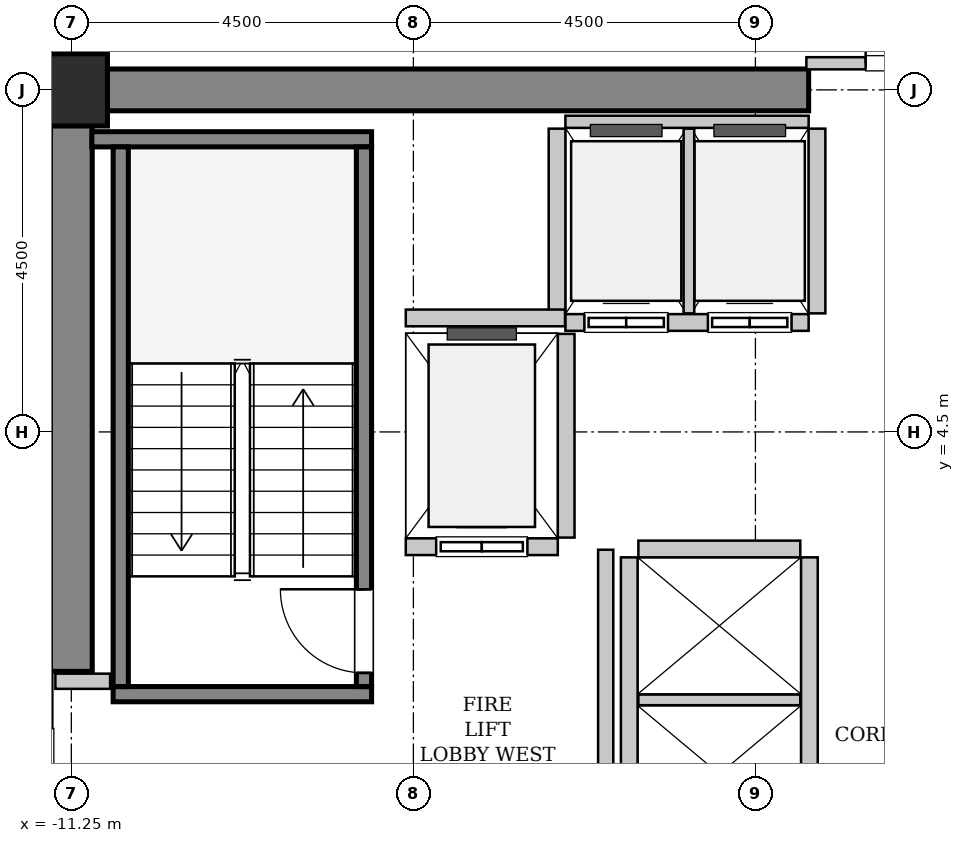
"""IFC4 building model, lengths in metres.
Left out: names, types, materials, properties, quantities, classifications, styles, units other than length and angle.
Written with IfcOpenShell. Run it as: python <this file> out.ifc"""

import sys

from ifc_helpers import new_model, si_unit, direction, frame, frame_2d, origin, origin_2d, place, context, subcontext, project, spatial, rectangle, hollow_rectangle, extrude, source, transform, mapped, element, fill, save


model = new_model("IFC4")
c1 = context("Model", 3, precision=1e-05, world=origin(), true_north=direction((0.0, 1.0)))
c2 = subcontext(c1, "Body", "Model", "MODEL_VIEW")
j1 = project(units=[si_unit("LENGTHUNIT", "METRE"), si_unit("PLANEANGLEUNIT", "RADIAN")], contexts=[c1])
p1 = place(None, origin())
s1 = spatial("IfcSite", under=j1, at=p1, CompositionType="ELEMENT")
p2 = place(p1, origin())
s2 = spatial("IfcBuilding", under=s1, at=p2, CompositionType="ELEMENT")
p3 = place(p2, frame((0.0, 0.0, 125.0)))
s3 = spatial("IfcBuildingStorey", under=s2, at=p3, CompositionType="ELEMENT", Elevation=125.0)
m1 = source(origin(), c2, "Body", "SweptSolid", [
    extrude(rectangle(XDim=9.975, YDim=0.55, at=frame_2d((4.987, 0.0))), origin(), (0.0, 0.0, 1.0), 3.8),
])
p4 = place(p3, frame((-11.525, 9.0, 0.0), z_axis=(0.0, 0.0, 1.0), x_axis=(1.0, 0.0, 0.0)))
e1 = element("IfcWall", 1, at=p4, inside=s3, PredefinedType="SHEAR", context=c2, shape_type="MappedRepresentation", body=[
    mapped(m1, transform((0.0, 0.0, 0.0), x_axis=(1.0, 0.0, 0.0), y_axis=(0.0, 1.0, 0.0), z_axis=(0.0, 0.0, 1.0), scale=1.0)),
])
m2 = source(origin(), c2, "Body", "SweptSolid", [
    extrude(rectangle(XDim=7.375, YDim=0.55, at=frame_2d((3.688, 0.0))), origin(), (0.0, 0.0, 1.0), 3.8),
])
p5 = place(p3, frame((-11.25, 1.35, 0.0), z_axis=(0.0, 0.0, 1.0), x_axis=(0.0, 1.0, 0.0)))
e2 = element("IfcWall", 2, at=p5, inside=s3, PredefinedType="SHEAR", context=c2, shape_type="MappedRepresentation", body=[
    mapped(m2, transform((0.0, 0.0, 0.0), x_axis=(1.0, 0.0, 0.0), y_axis=(0.0, 1.0, 0.0), z_axis=(0.0, 0.0, 1.0), scale=1.0)),
])
m3 = source(origin(), c2, "Body", "SweptSolid", [
    extrude(hollow_rectangle(XDim=0.95, YDim=0.95, WallThickness=0.045, InnerFilletRadius=0.045, OuterFilletRadius=0.09, at=origin_2d()), origin(), (0.0, 0.0, 1.0), 3.8),
])
p6 = place(p3, frame((-11.25, 9.0, 0.0), z_axis=(0.0, 0.0, 1.0), x_axis=(1.0, 0.0, 0.0)))
e3 = element("IfcColumn", 3, at=p6, inside=s3, PredefinedType="COLUMN", context=c2, shape_type="MappedRepresentation", body=[
    mapped(m3, transform((0.0, 0.0, 0.0), x_axis=(1.0, 0.0, 0.0), y_axis=(0.0, 1.0, 0.0), z_axis=(0.0, 0.0, 1.0), scale=1.0)),
])
m4 = source(origin(), c2, "Body", "SweptSolid", [
    extrude(rectangle(XDim=3.4, YDim=0.2, at=frame_2d((1.7, 0.0))), origin(), (0.0, 0.0, 1.0), 3.8),
])
p7 = place(p3, frame((-7.3, 1.05, 0.0), z_axis=(0.0, 0.0, 1.0), x_axis=(-1.0, 0.0, 0.0)))
e4 = element("IfcWall", 4, at=p7, inside=s3, PredefinedType="SOLIDWALL", context=c2, shape_type="MappedRepresentation", body=[
    mapped(m4, transform((0.0, 0.0, 0.0), x_axis=(1.0, 0.0, 0.0), y_axis=(0.0, 1.0, 0.0), z_axis=(0.0, 0.0, 1.0), scale=1.0)),
])
m5 = source(origin(), c2, "Body", "SweptSolid", [
    extrude(rectangle(XDim=3.68, YDim=0.2, at=frame_2d((1.84, 0.0))), origin(), (0.0, 0.0, 1.0), 3.8),
])
p8 = place(p3, frame((-7.3, 8.35, 0.0), z_axis=(0.0, 0.0, 1.0), x_axis=(-1.0, 0.0, 0.0)))
e5 = element("IfcWall", 5, at=p8, inside=s3, PredefinedType="SOLIDWALL", context=c2, shape_type="MappedRepresentation", body=[
    mapped(m5, transform((0.0, 0.0, 0.0), x_axis=(1.0, 0.0, 0.0), y_axis=(0.0, 1.0, 0.0), z_axis=(0.0, 0.0, 1.0), scale=1.0)),
])
m6 = source(origin(), c2, "Body", "SweptSolid", [
    extrude(rectangle(XDim=7.1, YDim=0.2, at=frame_2d((3.55, 0.0))), origin(), (0.0, 0.0, 1.0), 3.8),
])
p9 = place(p3, frame((-7.4, 1.15, 0.0), z_axis=(0.0, 0.0, 1.0), x_axis=(0.0, 1.0, 0.0)))
e6 = element("IfcWall", 6, at=p9, inside=s3, PredefinedType="SOLIDWALL", context=c2, shape_type="MappedRepresentation", body=[
    mapped(m6, transform((0.0, 0.0, 0.0), x_axis=(1.0, 0.0, 0.0), y_axis=(0.0, 1.0, 0.0), z_axis=(0.0, 0.0, 1.0), scale=1.0)),
])
p10 = place(p9, frame((0.18, 0.0, 0.0)))
e7 = element("IfcOpeningElement", 7, at=p10, cuts=e6, PredefinedType="OPENING", context=c2, shape_type="SweptSolid", body=[
    extrude(rectangle(XDim=1.1, YDim=2.15, at=frame_2d((0.55, 1.075))), frame((0.0, 0.11, 0.0), z_axis=(0.0, -1.0, 0.0), x_axis=(1.0, 0.0, 0.0)), (0.0, 0.0, 1.0), 0.22),
])
p11 = place(p3, frame((-10.6, 1.15, 0.0), z_axis=(0.0, 0.0, 1.0), x_axis=(0.0, 1.0, 0.0)))
e8 = element("IfcWall", 8, at=p11, inside=s3, PredefinedType="SOLIDWALL", context=c2, shape_type="MappedRepresentation", body=[
    mapped(m6, transform((0.0, 0.0, 0.0), x_axis=(1.0, 0.0, 0.0), y_axis=(0.0, 1.0, 0.0), z_axis=(0.0, 0.0, 1.0), scale=1.0)),
])
m7 = source(origin(), c2, "Body", "SweptSolid", [
    extrude(rectangle(XDim=2.0, YDim=0.22, at=frame_2d((1.0, 0.0))), origin(), (0.0, 0.0, 1.0), 3.535),
])
p12 = place(p3, frame((-6.85, 2.99, 0.0), z_axis=(0.0, 0.0, 1.0), x_axis=(1.0, 0.0, 0.0)))
e9 = element("IfcWall", 9, at=p12, inside=s3, PredefinedType="SOLIDWALL", context=c2, shape_type="MappedRepresentation", body=[
    mapped(m7, transform((0.0, 0.0, 0.0), x_axis=(1.0, 0.0, 0.0), y_axis=(0.0, 1.0, 0.0), z_axis=(0.0, 0.0, 1.0), scale=1.0)),
])
p13 = place(p12, frame((0.4, 0.0, 0.0)))
e10 = element("IfcOpeningElement", 10, at=p13, cuts=e9, PredefinedType="OPENING", context=c2, shape_type="SweptSolid", body=[
    extrude(rectangle(XDim=1.2, YDim=2.2, at=frame_2d((0.6, 1.1))), frame((0.0, 0.12, 0.0), z_axis=(0.0, -1.0, 0.0), x_axis=(1.0, 0.0, 0.0)), (0.0, 0.0, 1.0), 0.24),
])
m8 = source(origin(), c2, "Body", "SweptSolid", [
    extrude(rectangle(XDim=2.68, YDim=0.22, at=frame_2d((1.34, 0.0))), origin(), (0.0, 0.0, 1.0), 3.535),
])
p14 = place(p3, frame((-4.74, 3.11, 0.0), z_axis=(0.0, 0.0, 1.0), x_axis=(0.0, 1.0, 0.0)))
e11 = element("IfcWall", 11, at=p14, inside=s3, PredefinedType="SOLIDWALL", context=c2, shape_type="MappedRepresentation", body=[
    mapped(m8, transform((0.0, 0.0, 0.0), x_axis=(1.0, 0.0, 0.0), y_axis=(0.0, 1.0, 0.0), z_axis=(0.0, 0.0, 1.0), scale=1.0)),
])
m9 = source(origin(), c2, "Body", "SweptSolid", [
    extrude(rectangle(XDim=3.2, YDim=0.22, at=frame_2d((1.6, 0.0))), origin(), (0.0, 0.0, 1.0), 3.535),
])
p15 = place(p3, frame((-4.75, 5.94, 0.0), z_axis=(0.0, 0.0, 1.0), x_axis=(1.0, 0.0, 0.0)))
e12 = element("IfcWall", 12, at=p15, inside=s3, PredefinedType="SOLIDWALL", context=c2, shape_type="MappedRepresentation", body=[
    mapped(m9, transform((0.0, 0.0, 0.0), x_axis=(1.0, 0.0, 0.0), y_axis=(0.0, 1.0, 0.0), z_axis=(0.0, 0.0, 1.0), scale=1.0)),
])
p16 = place(p15, frame((0.25, 0.0, 0.0)))
e13 = element("IfcOpeningElement", 13, at=p16, cuts=e12, PredefinedType="OPENING", context=c2, shape_type="SweptSolid", body=[
    extrude(rectangle(XDim=1.1, YDim=2.2, at=frame_2d((0.55, 1.1))), frame((0.0, 0.12, 0.0), z_axis=(0.0, -1.0, 0.0), x_axis=(1.0, 0.0, 0.0)), (0.0, 0.0, 1.0), 0.24),
])
p17 = place(p15, frame((1.875, 0.0, 0.0)))
e14 = element("IfcOpeningElement", 14, at=p17, cuts=e12, PredefinedType="OPENING", context=c2, shape_type="SweptSolid", body=[
    extrude(rectangle(XDim=1.1, YDim=2.2, at=frame_2d((0.55, 1.1))), frame((0.0, 0.12, 0.0), z_axis=(0.0, -1.0, 0.0), x_axis=(1.0, 0.0, 0.0)), (0.0, 0.0, 1.0), 0.24),
])
m10 = source(origin(), c2, "Body", "SweptSolid", [
    extrude(rectangle(XDim=3.2, YDim=0.16, at=frame_2d((1.6, 0.0))), origin(), (0.0, 0.0, 1.0), 2.425),
])
p18 = place(p3, frame((-1.55, 8.58, 0.0), z_axis=(0.0, 0.0, 1.0), x_axis=(-1.0, 0.0, 0.0)))
e15 = element("IfcWall", 15, at=p18, inside=s3, PredefinedType="PARTITIONING", context=c2, shape_type="MappedRepresentation", body=[
    mapped(m10, transform((0.0, 0.0, 0.0), x_axis=(1.0, 0.0, 0.0), y_axis=(0.0, 1.0, 0.0), z_axis=(0.0, 0.0, 1.0), scale=1.0)),
])
m11 = source(origin(), c2, "Body", "SweptSolid", [
    extrude(rectangle(XDim=2.43, YDim=0.22, at=frame_2d((1.215, 0.0))), origin(), (0.0, 0.0, 1.0), 3.535),
])
p19 = place(p3, frame((-4.86, 8.49, 0.0), z_axis=(0.0, 0.0, 1.0), x_axis=(0.0, -1.0, 0.0)))
e16 = element("IfcWall", 16, at=p19, inside=s3, PredefinedType="SOLIDWALL", context=c2, shape_type="MappedRepresentation", body=[
    mapped(m11, transform((0.0, 0.0, 0.0), x_axis=(1.0, 0.0, 0.0), y_axis=(0.0, 1.0, 0.0), z_axis=(0.0, 0.0, 1.0), scale=1.0)),
])
m12 = source(origin(), c2, "Body", "SweptSolid", [
    extrude(rectangle(XDim=2.43, YDim=0.14, at=frame_2d((1.215, 0.0))), origin(), (0.0, 0.0, 1.0), 3.535),
])
p20 = place(p3, frame((-3.125, 6.06, 0.0), z_axis=(0.0, 0.0, 1.0), x_axis=(0.0, 1.0, 0.0)))
e17 = element("IfcWall", 17, at=p20, inside=s3, PredefinedType="PARTITIONING", context=c2, shape_type="MappedRepresentation", body=[
    mapped(m12, transform((0.0, 0.0, 0.0), x_axis=(1.0, 0.0, 0.0), y_axis=(0.0, 1.0, 0.0), z_axis=(0.0, 0.0, 1.0), scale=1.0)),
])
p21 = place(p3, frame((-1.44, 6.06, 0.0), z_axis=(0.0, 0.0, 1.0), x_axis=(0.0, 1.0, 0.0)))
e18 = element("IfcWall", 18, at=p21, inside=s3, PredefinedType="SOLIDWALL", context=c2, shape_type="MappedRepresentation", body=[
    mapped(m11, transform((0.0, 0.0, 0.0), x_axis=(1.0, 0.0, 0.0), y_axis=(0.0, 1.0, 0.0), z_axis=(0.0, 0.0, 1.0), scale=1.0)),
])
m13 = source(origin(), c2, "Body", "SweptSolid", [
    extrude(rectangle(XDim=5.7, YDim=0.22, at=frame_2d((2.85, 0.0))), origin(), (0.0, 0.0, 1.0), 3.535),
])
for number, where, z_axis, x_axis in (
    (19, (-1.54, -2.85, 0.0), (0.0, 0.0, 1.0), (0.0, 1.0, 0.0)),
    (20, (-3.91, 2.85, 0.0), (0.0, 0.0, 1.0), (0.0, -1.0, 0.0)),
):
    element("IfcWall", number, at=place(p3, frame(where, z_axis=z_axis, x_axis=x_axis)), inside=s3, PredefinedType="SOLIDWALL", context=c2, shape_type="MappedRepresentation", body=[
        mapped(m13, transform((0.0, 0.0, 0.0), x_axis=(1.0, 0.0, 0.0), y_axis=(0.0, 1.0, 0.0), z_axis=(0.0, 0.0, 1.0), scale=1.0)),
    ])
m14 = source(origin(), c2, "Body", "SweptSolid", [
    extrude(rectangle(XDim=2.13, YDim=0.14, at=frame_2d((1.065, 0.0))), origin(), (0.0, 0.0, 1.0), 3.535),
])
p22 = place(p3, frame((-3.79, 0.975, 0.0), z_axis=(0.0, 0.0, 1.0), x_axis=(1.0, 0.0, 0.0)))
e21 = element("IfcWall", 21, at=p22, inside=s3, PredefinedType="PARTITIONING", context=c2, shape_type="MappedRepresentation", body=[
    mapped(m14, transform((0.0, 0.0, 0.0), x_axis=(1.0, 0.0, 0.0), y_axis=(0.0, 1.0, 0.0), z_axis=(0.0, 0.0, 1.0), scale=1.0)),
])
m15 = source(origin(), c2, "Body", "SweptSolid", [
    extrude(rectangle(XDim=2.13, YDim=0.22, at=frame_2d((1.065, 0.0))), origin(), (0.0, 0.0, 1.0), 3.535),
])
p23 = place(p3, frame((-1.66, 2.96, 0.0), z_axis=(0.0, 0.0, 1.0), x_axis=(-1.0, 0.0, 0.0)))
e22 = element("IfcWall", 22, at=p23, inside=s3, PredefinedType="SOLIDWALL", context=c2, shape_type="MappedRepresentation", body=[
    mapped(m15, transform((0.0, 0.0, 0.0), x_axis=(1.0, 0.0, 0.0), y_axis=(0.0, 1.0, 0.0), z_axis=(0.0, 0.0, 1.0), scale=1.0)),
])
m16 = source(origin(), c2, "Body", "SweptSolid", [
    extrude(rectangle(XDim=2.095, YDim=0.22, at=frame_2d((1.048, 0.0))), origin(), (0.0, 0.0, 1.0), 3.535),
])
p24 = place(p3, frame((-6.85, 6.0, 0.0), z_axis=(0.0, 0.0, 1.0), x_axis=(1.0, 0.0, 0.0)))
e23 = element("IfcWall", 23, at=p24, inside=s3, PredefinedType="SOLIDWALL", context=c2, shape_type="MappedRepresentation", body=[
    mapped(m16, transform((0.0, 0.0, 0.0), x_axis=(1.0, 0.0, 0.0), y_axis=(0.0, 1.0, 0.0), z_axis=(0.0, 0.0, 1.0), scale=1.0)),
])
m17 = source(origin(), c2, "Body", "SweptSolid", [
    extrude(rectangle(XDim=5.9, YDim=0.2, at=frame_2d((2.95, 0.0))), origin(), (0.0, 0.0, 1.0), 3.535),
])
p25 = place(p3, frame((-4.22, -2.95, 0.0), z_axis=(0.0, 0.0, 1.0), x_axis=(0.0, 1.0, 0.0)))
e24 = element("IfcWall", 24, at=p25, inside=s3, PredefinedType="PARTITIONING", context=c2, shape_type="MappedRepresentation", body=[
    mapped(m17, transform((0.0, 0.0, 0.0), x_axis=(1.0, 0.0, 0.0), y_axis=(0.0, 1.0, 0.0), z_axis=(0.0, 0.0, 1.0), scale=1.0)),
])
m18 = source(origin(), c2, "Body", "SweptSolid", [
    extrude(rectangle(XDim=0.72, YDim=0.2, at=frame_2d((0.36, 0.0))), origin(), (0.0, 0.0, 1.0), 3.535),
])
p26 = place(p3, frame((-11.46, 1.22, 0.0), z_axis=(0.0, 0.0, 1.0), x_axis=(1.0, 0.0, 0.0)))
e25 = element("IfcWall", 25, at=p26, inside=s3, PredefinedType="PARTITIONING", context=c2, shape_type="MappedRepresentation", body=[
    mapped(m18, transform((0.0, 0.0, 0.0), x_axis=(1.0, 0.0, 0.0), y_axis=(0.0, 1.0, 0.0), z_axis=(0.0, 0.0, 1.0), scale=1.0)),
])
m19 = source(origin(), c2, "Body", "SweptSolid", [
    extrude(rectangle(XDim=3.16, YDim=0.16, at=frame_2d((1.58, 0.0))), origin(), (0.0, 0.0, 1.0), 2.425),
])
p27 = place(p3, frame((-1.58, 9.35, 0.0), z_axis=(0.0, 0.0, 1.0), x_axis=(1.0, 0.0, 0.0)))
e26 = element("IfcWall", 26, at=p27, inside=s3, PredefinedType="PARTITIONING", context=c2, shape_type="MappedRepresentation", body=[
    mapped(m19, transform((0.0, 0.0, 0.0), x_axis=(1.0, 0.0, 0.0), y_axis=(0.0, 1.0, 0.0), z_axis=(0.0, 0.0, 1.0), scale=1.0)),
])
p28 = place(p27, frame((0.78, 0.0, 0.0)))
e27 = element("IfcOpeningElement", 27, at=p28, cuts=e26, PredefinedType="OPENING", context=c2, shape_type="SweptSolid", body=[
    extrude(rectangle(XDim=1.6, YDim=2.3, at=frame_2d((0.8, 1.15))), frame((0.0, 0.09, 0.0), z_axis=(0.0, -1.0, 0.0), x_axis=(1.0, 0.0, 0.0)), (0.0, 0.0, 1.0), 0.18),
])
m20 = source(origin(), c2, "Body", "SweptSolid", [
    extrude(rectangle(XDim=1.1, YDim=2.15, at=frame_2d((0.55, 1.075))), frame((0.0, 0.025, 0.0), z_axis=(0.0, -1.0, 0.0), x_axis=(1.0, 0.0, 0.0)), (0.0, 0.0, 1.0), 0.05),
])
p29 = place(p10, origin())
e28 = element("IfcDoor", 28, at=p29, inside=s3, OperationType="SINGLE_SWING_RIGHT", PredefinedType="DOOR", context=c2, shape_type="MappedRepresentation", body=[
    mapped(m20, transform((0.0, 0.0, 0.0), x_axis=(1.0, 0.0, 0.0), y_axis=(0.0, 1.0, 0.0), z_axis=(0.0, 0.0, 1.0), scale=1.0)),
])
fill(e7, e28)
m21 = source(origin(), c2, "Body", "SweptSolid", [
    extrude(rectangle(XDim=1.2, YDim=2.2, at=frame_2d((0.6, 1.1))), frame((0.0, 0.025, 0.0), z_axis=(0.0, -1.0, 0.0), x_axis=(1.0, 0.0, 0.0)), (0.0, 0.0, 1.0), 0.05),
])
p30 = place(p13, origin())
e29 = element("IfcDoor", 29, at=p30, inside=s3, OperationType="SLIDING_TO_LEFT", PredefinedType="DOOR", context=c2, shape_type="MappedRepresentation", body=[
    mapped(m21, transform((0.0, 0.0, 0.0), x_axis=(1.0, 0.0, 0.0), y_axis=(0.0, 1.0, 0.0), z_axis=(0.0, 0.0, 1.0), scale=1.0)),
])
fill(e10, e29)
m22 = source(origin(), c2, "Body", "SweptSolid", [
    extrude(rectangle(XDim=1.1, YDim=2.2, at=frame_2d((0.55, 1.1))), frame((0.0, 0.025, 0.0), z_axis=(0.0, -1.0, 0.0), x_axis=(1.0, 0.0, 0.0)), (0.0, 0.0, 1.0), 0.05),
])
p31 = place(p16, origin())
e30 = element("IfcDoor", 30, at=p31, inside=s3, OperationType="DOUBLE_DOOR_SLIDING", PredefinedType="DOOR", context=c2, shape_type="MappedRepresentation", body=[
    mapped(m22, transform((0.0, 0.0, 0.0), x_axis=(1.0, 0.0, 0.0), y_axis=(0.0, 1.0, 0.0), z_axis=(0.0, 0.0, 1.0), scale=1.0)),
])
fill(e13, e30)
p32 = place(p17, origin())
e31 = element("IfcDoor", 31, at=p32, inside=s3, OperationType="DOUBLE_DOOR_SLIDING", PredefinedType="DOOR", context=c2, shape_type="MappedRepresentation", body=[
    mapped(m22, transform((0.0, 0.0, 0.0), x_axis=(1.0, 0.0, 0.0), y_axis=(0.0, 1.0, 0.0), z_axis=(0.0, 0.0, 1.0), scale=1.0)),
])
fill(e14, e31)
m23 = source(origin(), c2, "Body", "SweptSolid", [
    extrude(rectangle(XDim=1.6, YDim=2.3, at=frame_2d((0.8, 1.15))), frame((0.0, 0.025, 0.0), z_axis=(0.0, -1.0, 0.0), x_axis=(1.0, 0.0, 0.0)), (0.0, 0.0, 1.0), 0.05),
])
p33 = place(p28, origin())
e32 = element("IfcDoor", 32, at=p33, inside=s3, OperationType="DOUBLE_DOOR_SINGLE_SWING", PredefinedType="DOOR", context=c2, shape_type="MappedRepresentation", body=[
    mapped(m23, transform((0.0, 0.0, 0.0), x_axis=(1.0, 0.0, 0.0), y_axis=(0.0, 1.0, 0.0), z_axis=(0.0, 0.0, 1.0), scale=1.0)),
])
fill(e27, e32)
save(model, sys.argv[1])
